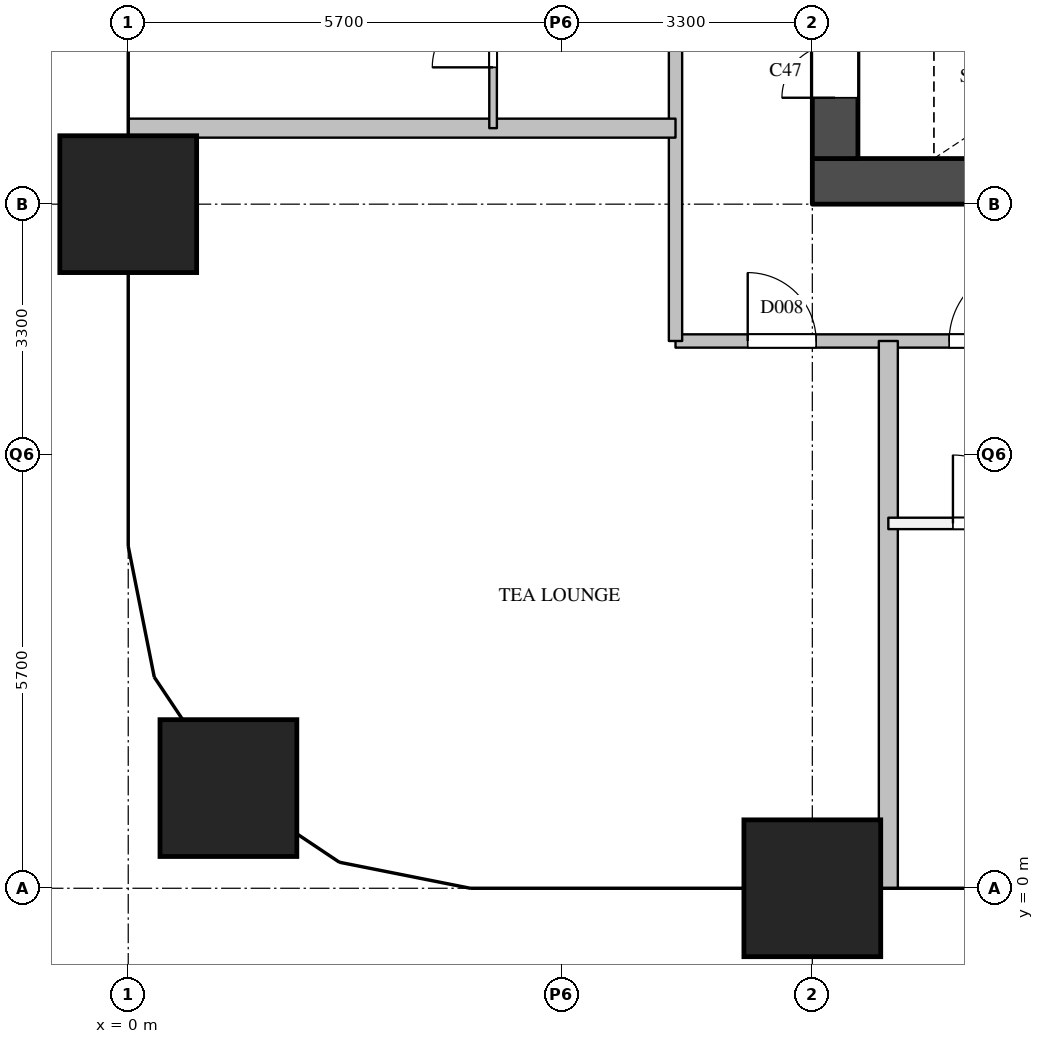
"""IFC4 building model, lengths in metres.
Left out: names, types, materials, properties, quantities, classifications, styles, units other than length and angle.
Written with IfcOpenShell. Run it as: python <this file> out.ifc"""

import sys

from ifc_helpers import new_model, si_unit, direction, frame, frame_2d, origin, origin_2d, place, context, subcontext, project, spatial, rectangle, extrude, element, fill, save


model = new_model("IFC4")
c1 = context("Model", 3, precision=1e-05, world=origin(), true_north=direction((0.0, 1.0)))
c2 = subcontext(c1, "Body", "Model", "MODEL_VIEW")
j1 = project(units=[si_unit("LENGTHUNIT", "METRE"), si_unit("PLANEANGLEUNIT", "RADIAN")], contexts=[c1])
p1 = place(None, origin())
s1 = spatial("IfcSite", under=j1, at=p1, CompositionType="ELEMENT")
p2 = place(p1, origin())
s2 = spatial("IfcBuilding", under=s1, at=p2, CompositionType="ELEMENT")
p3 = place(p2, frame((0.0, 0.0, 42.4)))
s3 = spatial("IfcBuildingStorey", under=s2, at=p3, CompositionType="ELEMENT", Elevation=42.4)
for number, where, z_axis, x_axis in (
    (1, (1.318, 1.318, 0.0), (0.0, 0.0, 1.0), (1.0, 0.0, 0.0)),
    (2, (0.0, 9.0, 0.0), (0.0, 0.0, 1.0), (1.0, 0.0, 0.0)),
    (3, (9.0, 0.0, 0.0), (0.0, 0.0, 1.0), (1.0, 0.0, 0.0)),
):
    element("IfcColumn", number, at=place(p3, frame(where, z_axis=z_axis, x_axis=x_axis)), inside=s3, PredefinedType="COLUMN", context=c2, shape_type="SweptSolid", body=[
        extrude(rectangle(XDim=1.8, YDim=1.8, at=origin_2d()), origin(), (0.0, 0.0, 1.0), 3.8),
    ])
p4 = place(p3, frame((9.0, 9.3, 0.0), z_axis=(0.0, 0.0, 1.0), x_axis=(1.0, 0.0, 0.0)))
e4 = element("IfcWall", 4, at=p4, inside=s3, PredefinedType="SHEAR", context=c2, shape_type="SweptSolid", body=[
    extrude(rectangle(XDim=9.0, YDim=0.6, at=frame_2d((4.5, 0.0))), origin(), (0.0, 0.0, 1.0), 3.5),
])
p5 = place(p3, frame((9.3, 9.6, 0.0), z_axis=(0.0, 0.0, 1.0), x_axis=(0.0, 1.0, 0.0)))
e5 = element("IfcWall", 5, at=p5, inside=s3, PredefinedType="SHEAR", context=c2, shape_type="SweptSolid", body=[
    extrude(rectangle(XDim=12.3, YDim=0.6, at=frame_2d((6.15, 0.0))), origin(), (0.0, 0.0, 1.0), 3.5),
])
p6 = place(p5, frame((0.8, 0.0, 0.0)))
e6 = element("IfcOpeningElement", 6, at=p6, cuts=e5, PredefinedType="OPENING", context=c2, shape_type="SweptSolid", body=[
    extrude(rectangle(XDim=0.7, YDim=2.1, at=frame_2d((0.35, 1.05))), frame((0.0, 0.31, 0.0), z_axis=(0.0, -1.0, 0.0), x_axis=(1.0, 0.0, 0.0)), (0.0, 0.0, 1.0), 0.62),
])
p7 = place(p5, frame((4.8, 0.0, 0.0)))
e7 = element("IfcOpeningElement", 7, at=p7, cuts=e5, PredefinedType="OPENING", context=c2, shape_type="SweptSolid", body=[
    extrude(rectangle(XDim=1.0, YDim=2.1, at=frame_2d((0.5, 1.05))), frame((0.0, 0.31, 0.0), z_axis=(0.0, -1.0, 0.0), x_axis=(1.0, 0.0, 0.0)), (0.0, 0.0, 1.0), 0.62),
])
p8 = place(p3, frame((7.2, 7.2, 0.0), z_axis=(0.0, 0.0, 1.0), x_axis=(1.0, 0.0, 0.0)))
e8 = element("IfcWall", 8, at=p8, inside=s3, PredefinedType="PARTITIONING", context=c2, shape_type="SweptSolid", body=[
    extrude(rectangle(XDim=12.6, YDim=0.175, at=frame_2d((6.3, 0.0))), origin(), (0.0, 0.0, 1.0), 3.5),
])
p9 = place(p8, frame((3.6, 0.0, 0.0)))
e9 = element("IfcOpeningElement", 9, at=p9, cuts=e8, PredefinedType="OPENING", context=c2, shape_type="SweptSolid", body=[
    extrude(rectangle(XDim=1.0, YDim=2.1, at=frame_2d((0.5, 1.05))), frame((0.0, 0.097, 0.0), z_axis=(0.0, -1.0, 0.0), x_axis=(1.0, 0.0, 0.0)), (0.0, 0.0, 1.0), 0.195),
])
p10 = place(p8, frame((0.95, 0.0, 0.0)))
e10 = element("IfcOpeningElement", 10, at=p10, cuts=e8, PredefinedType="OPENING", context=c2, shape_type="SweptSolid", body=[
    extrude(rectangle(XDim=0.9, YDim=2.1, at=frame_2d((0.45, 1.05))), frame((0.0, 0.097, 0.0), z_axis=(0.0, -1.0, 0.0), x_axis=(1.0, 0.0, 0.0)), (0.0, 0.0, 1.0), 0.195),
])
p11 = place(p3, frame((7.2, 7.2, 0.0), z_axis=(0.0, 0.0, 1.0), x_axis=(0.0, 1.0, 0.0)))
e11 = element("IfcWall", 11, at=p11, inside=s3, PredefinedType="PARTITIONING", context=c2, shape_type="SweptSolid", body=[
    extrude(rectangle(XDim=16.49, YDim=0.175, at=frame_2d((8.245, 0.0))), origin(), (0.0, 0.0, 1.0), 3.5),
])
p12 = place(p11, frame((8.5, 0.0, 0.0)))
e12 = element("IfcOpeningElement", 12, at=p12, cuts=e11, PredefinedType="OPENING", context=c2, shape_type="SweptSolid", body=[
    extrude(rectangle(XDim=1.0, YDim=2.1, at=frame_2d((0.5, 1.05))), frame((0.0, 0.097, 0.0), z_axis=(0.0, -1.0, 0.0), x_axis=(1.0, 0.0, 0.0)), (0.0, 0.0, 1.0), 0.195),
])
p13 = place(p11, frame((14.195, 0.0, 0.0)))
e13 = element("IfcOpeningElement", 13, at=p13, cuts=e11, PredefinedType="OPENING", context=c2, shape_type="SweptSolid", body=[
    extrude(rectangle(XDim=0.9, YDim=2.1, at=frame_2d((0.45, 1.05))), frame((0.0, 0.097, 0.0), z_axis=(0.0, -1.0, 0.0), x_axis=(1.0, 0.0, 0.0)), (0.0, 0.0, 1.0), 0.195),
])
p14 = place(p3, frame((10.0, 4.8, 0.0), z_axis=(0.0, 0.0, 1.0), x_axis=(1.0, 0.0, 0.0)))
e14 = element("IfcWall", 14, at=p14, inside=s3, PredefinedType="PARTITIONING", context=c2, shape_type="SweptSolid", body=[
    extrude(rectangle(XDim=2.6, YDim=0.15, at=frame_2d((1.3, 0.0))), origin(), (0.0, 0.0, 1.0), 3.5),
])
p15 = place(p14, frame((0.85, 0.0, 0.0)))
e15 = element("IfcOpeningElement", 15, at=p15, cuts=e14, PredefinedType="OPENING", context=c2, shape_type="SweptSolid", body=[
    extrude(rectangle(XDim=0.9, YDim=2.1, at=frame_2d((0.45, 1.05))), frame((0.0, 0.085, 0.0), z_axis=(0.0, -1.0, 0.0), x_axis=(1.0, 0.0, 0.0)), (0.0, 0.0, 1.0), 0.17),
])
for number, where, z_axis, x_axis in (
    (16, (0.0, 10.0, 0.0), (0.0, 0.0, 1.0), (1.0, 0.0, 0.0)),
    (17, (10.0, 0.0, 0.0), (0.0, 0.0, 1.0), (0.0, 1.0, 0.0)),
):
    element("IfcWall", number, at=place(p3, frame(where, z_axis=z_axis, x_axis=x_axis)), inside=s3, PredefinedType="PARTITIONING", context=c2, shape_type="SweptSolid", body=[
        extrude(rectangle(XDim=7.2, YDim=0.25, at=frame_2d((3.6, 0.0))), origin(), (0.0, 0.0, 1.0), 2.5),
    ])
p16 = place(p3, frame((4.8, 10.0, 0.0), z_axis=(0.0, 0.0, 1.0), x_axis=(0.0, 1.0, 0.0)))
e18 = element("IfcWall", 18, at=p16, inside=s3, PredefinedType="PARTITIONING", context=c2, shape_type="SweptSolid", body=[
    extrude(rectangle(XDim=2.4, YDim=0.1, at=frame_2d((1.2, 0.0))), origin(), (0.0, 0.0, 1.0), 3.5),
])
p17 = place(p16, frame((0.8, 0.0, 0.0)))
e19 = element("IfcOpeningElement", 19, at=p17, cuts=e18, PredefinedType="OPENING", context=c2, shape_type="SweptSolid", body=[
    extrude(rectangle(XDim=0.8, YDim=2.1, at=frame_2d((0.4, 1.05))), frame((0.0, 0.06, 0.0), z_axis=(0.0, -1.0, 0.0), x_axis=(1.0, 0.0, 0.0)), (0.0, 0.0, 1.0), 0.12),
])
p18 = place(p6, origin())
e20 = element("IfcDoor", 20, at=p18, inside=s3, OperationType="SINGLE_SWING_LEFT", PredefinedType="DOOR", context=c2, shape_type="SweptSolid", body=[
    extrude(rectangle(XDim=0.7, YDim=2.1, at=frame_2d((0.35, 1.05))), frame((0.0, 0.025, 0.0), z_axis=(0.0, -1.0, 0.0), x_axis=(1.0, 0.0, 0.0)), (0.0, 0.0, 1.0), 0.05),
])
fill(e6, e20)
p19 = place(p9, origin())
e21 = element("IfcDoor", 21, at=p19, inside=s3, OperationType="SINGLE_SWING_RIGHT", PredefinedType="DOOR", context=c2, shape_type="SweptSolid", body=[
    extrude(rectangle(XDim=1.0, YDim=2.1, at=frame_2d((0.5, 1.05))), frame((0.0, 0.025, 0.0), z_axis=(0.0, -1.0, 0.0), x_axis=(1.0, 0.0, 0.0)), (0.0, 0.0, 1.0), 0.05),
])
fill(e9, e21)
p20 = place(p15, origin())
e22 = element("IfcDoor", 22, at=p20, inside=s3, OperationType="SINGLE_SWING_LEFT", PredefinedType="DOOR", context=c2, shape_type="SweptSolid", body=[
    extrude(rectangle(XDim=0.9, YDim=2.1, at=frame_2d((0.45, 1.05))), frame((0.0, 0.025, 0.0), z_axis=(0.0, -1.0, 0.0), x_axis=(1.0, 0.0, 0.0)), (0.0, 0.0, 1.0), 0.05),
])
fill(e15, e22)
p21 = place(p10, origin())
e23 = element("IfcDoor", 23, at=p21, inside=s3, OperationType="SINGLE_SWING_LEFT", PredefinedType="DOOR", context=c2, shape_type="SweptSolid", body=[
    extrude(rectangle(XDim=0.9, YDim=2.1, at=frame_2d((0.45, 1.05))), frame((0.0, 0.025, 0.0), z_axis=(0.0, -1.0, 0.0), x_axis=(1.0, 0.0, 0.0)), (0.0, 0.0, 1.0), 0.05),
])
fill(e10, e23)
p22 = place(p17, origin())
e24 = element("IfcDoor", 24, at=p22, inside=s3, OperationType="SINGLE_SWING_LEFT", PredefinedType="DOOR", context=c2, shape_type="SweptSolid", body=[
    extrude(rectangle(XDim=0.8, YDim=2.1, at=frame_2d((0.4, 1.05))), frame((0.0, 0.025, 0.0), z_axis=(0.0, -1.0, 0.0), x_axis=(1.0, 0.0, 0.0)), (0.0, 0.0, 1.0), 0.05),
])
fill(e19, e24)
save(model, sys.argv[1])
